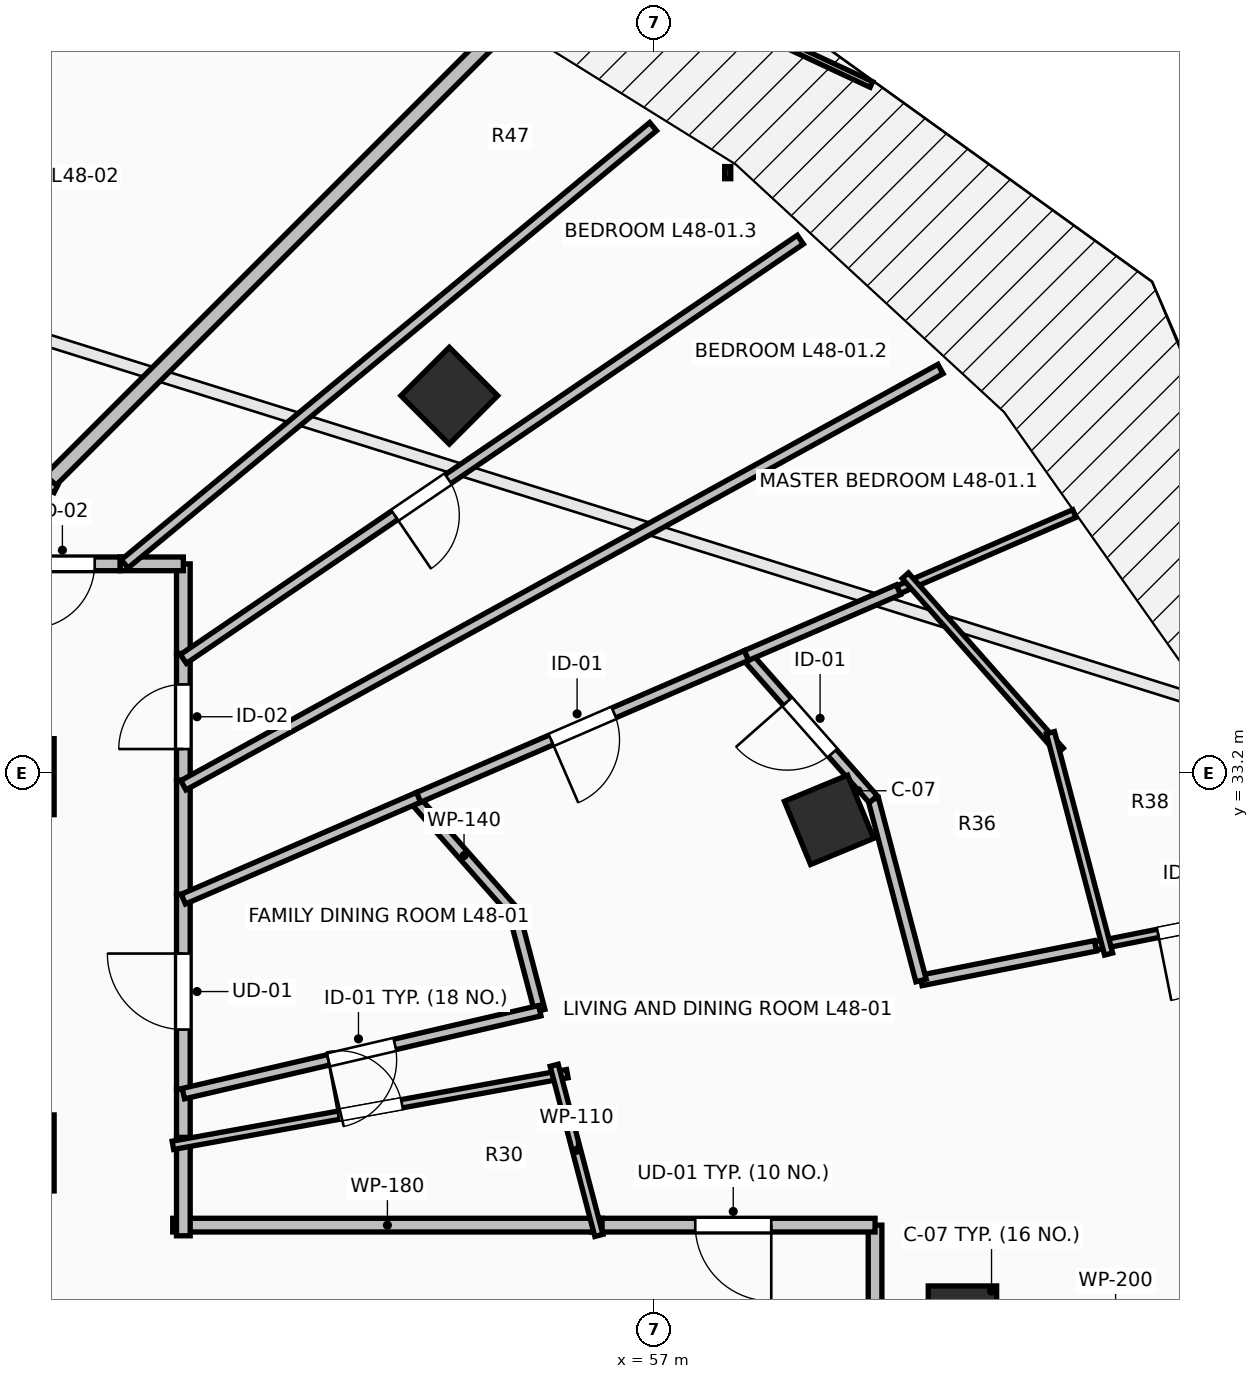
"""IFC4 building model, lengths in metres.
Left out: names, types, materials, properties, quantities, classifications, styles, units other than length and angle.
Written with IfcOpenShell. Run it as: python <this file> out.ifc"""

import sys

from ifc_helpers import new_model, si_unit, direction, frame, frame_2d, origin, origin_2d, place, context, subcontext, project, spatial, rectangle, extrude, element, fill, save


model = new_model("IFC4")
c1 = context("Model", 3, precision=1e-05, world=origin(), true_north=direction((0.0, 1.0)))
c2 = subcontext(c1, "Body", "Model", "MODEL_VIEW")
j1 = project(units=[si_unit("LENGTHUNIT", "METRE"), si_unit("PLANEANGLEUNIT", "RADIAN")], contexts=[c1])
p1 = place(None, origin())
s1 = spatial("IfcSite", under=j1, at=p1, CompositionType="ELEMENT")
p2 = place(p1, origin())
s2 = spatial("IfcBuilding", under=s1, at=p2, CompositionType="ELEMENT")
p3 = place(p2, frame((0.0, 0.0, 179.1)))
s3 = spatial("IfcBuildingStorey", under=s2, at=p3, CompositionType="ELEMENT", Elevation=179.1)
for number, where, z_axis, x_axis in (
    (1, (61.05, 26.0, 0.0), (0.0, 0.0, 1.0), (1.0, 0.0, 0.0)),
    (2, (59.295, 32.582, 0.0), (0.0, 0.0, 1.0), (0.924, 0.383, 0.0)),
    (3, (54.299, 38.162, 0.0), (0.0, 0.0, 1.0), (0.707, 0.707, 0.0)),
):
    element("IfcColumn", number, at=place(p3, frame(where, z_axis=z_axis, x_axis=x_axis)), inside=s3, PredefinedType="COLUMN", context=c2, shape_type="SweptSolid", body=[
        extrude(rectangle(XDim=0.9, YDim=0.9, at=origin_2d()), origin(), (0.0, 0.0, 1.0), 3.5),
    ])
for number, where, z_axis, x_axis in (
    (4, (48.75, 33.15, 0.0), (0.0, 0.0, 1.0), (1.0, 0.0, 0.0)),
    (5, (48.75, 28.2, 0.0), (0.0, 0.0, 1.0), (1.0, 0.0, 0.0)),
):
    element("IfcColumn", number, at=place(p3, frame(where, z_axis=z_axis, x_axis=x_axis)), inside=s3, PredefinedType="PILASTER", context=c2, shape_type="SweptSolid", body=[
        extrude(rectangle(XDim=0.7, YDim=1.0, at=origin_2d()), origin(), (0.0, 0.0, 1.0), 3.5),
    ])
p4 = place(p3, frame((59.9, 25.94, 0.0), z_axis=(0.0, 0.0, 1.0), x_axis=(0.0, 1.0, 0.0)))
e6 = element("IfcWall", 6, at=p4, inside=s3, PredefinedType="PARTITIONING", context=c2, shape_type="SweptSolid", body=[
    extrude(rectangle(XDim=1.31, YDim=0.18, at=frame_2d((0.655, 0.0))), origin(), (0.0, 0.0, 1.0), 2.432),
])
p5 = place(p3, frame((59.9, 27.25, 0.0), z_axis=(0.0, 0.0, 1.0), x_axis=(-1.0, 0.0, 0.0)))
e7 = element("IfcWall", 7, at=p5, inside=s3, PredefinedType="PARTITIONING", context=c2, shape_type="SweptSolid", body=[
    extrude(rectangle(XDim=3.731, YDim=0.18, at=frame_2d((1.865, 0.0))), origin(), (0.0, 0.0, 1.0), 2.874),
])
p6 = place(p5, frame((1.365, 0.0, 0.0)))
e8 = element("IfcOpeningElement", 8, at=p6, cuts=e7, PredefinedType="OPENING", context=c2, shape_type="SweptSolid", body=[
    extrude(rectangle(XDim=1.0, YDim=2.15, at=frame_2d((0.5, 1.075))), frame((0.0, 0.105, 0.0), z_axis=(0.0, -1.0, 0.0), x_axis=(1.0, 0.0, 0.0)), (0.0, 0.0, 1.0), 0.21),
])
p7 = place(p3, frame((50.8, 28.265, 0.0), z_axis=(0.0, 0.0, 1.0), x_axis=(0.0, 1.0, 0.0)))
e9 = element("IfcWall", 9, at=p7, inside=s3, PredefinedType="PARTITIONING", context=c2, shape_type="SweptSolid", body=[
    extrude(rectangle(XDim=0.777, YDim=0.18, at=frame_2d((0.389, 0.0))), origin(), (0.0, 0.0, 1.0), 3.24),
])
p8 = place(p3, frame((50.8, 29.042, 0.0), z_axis=(0.0, 0.0, 1.0), x_axis=(0.0, 1.0, 0.0)))
e10 = element("IfcWall", 10, at=p8, inside=s3, PredefinedType="PARTITIONING", context=c2, shape_type="SweptSolid", body=[
    extrude(rectangle(XDim=2.562, YDim=0.18, at=frame_2d((1.281, 0.0))), origin(), (0.0, 0.0, 1.0), 3.24),
])
p9 = place(p8, frame((0.781, 0.0, 0.0)))
e11 = element("IfcOpeningElement", 11, at=p9, cuts=e10, PredefinedType="OPENING", context=c2, shape_type="SweptSolid", body=[
    extrude(rectangle(XDim=1.0, YDim=2.15, at=frame_2d((0.5, 1.075))), frame((0.0, 0.105, 0.0), z_axis=(0.0, -1.0, 0.0), x_axis=(1.0, 0.0, 0.0)), (0.0, 0.0, 1.0), 0.21),
])
p10 = place(p3, frame((56.309, 27.25, 0.0), z_axis=(0.0, 0.0, 1.0), x_axis=(-1.0, 0.0, 0.0)))
e12 = element("IfcWall", 12, at=p10, inside=s3, PredefinedType="PARTITIONING", context=c2, shape_type="SweptSolid", body=[
    extrude(rectangle(XDim=5.649, YDim=0.18, at=frame_2d((2.825, 0.0))), origin(), (0.0, 0.0, 1.0), 2.432),
])
p11 = place(p3, frame((50.8, 27.11, 0.0), z_axis=(0.0, 0.0, 1.0), x_axis=(0.0, 1.0, 0.0)))
e13 = element("IfcWall", 13, at=p11, inside=s3, PredefinedType="PARTITIONING", context=c2, shape_type="SweptSolid", body=[
    extrude(rectangle(XDim=1.295, YDim=0.18, at=frame_2d((0.647, 0.0))), origin(), (0.0, 0.0, 1.0), 2.432),
])
p12 = place(p3, frame((50.8, 31.604, 0.0), z_axis=(0.0, 0.0, 1.0), x_axis=(0.0, 1.0, 0.0)))
e14 = element("IfcWall", 14, at=p12, inside=s3, PredefinedType="PARTITIONING", context=c2, shape_type="SweptSolid", body=[
    extrude(rectangle(XDim=1.501, YDim=0.18, at=frame_2d((0.75, 0.0))), origin(), (0.0, 0.0, 1.0), 2.432),
])
p13 = place(p3, frame((50.8, 33.105, 0.0), z_axis=(0.0, 0.0, 1.0), x_axis=(0.0, 1.0, 0.0)))
e15 = element("IfcWall", 15, at=p13, inside=s3, PredefinedType="PARTITIONING", context=c2, shape_type="SweptSolid", body=[
    extrude(rectangle(XDim=1.667, YDim=0.18, at=frame_2d((0.833, 0.0))), origin(), (0.0, 0.0, 1.0), 2.432),
])
p14 = place(p13, frame((0.408, 0.0, 0.0)))
e16 = element("IfcOpeningElement", 16, at=p14, cuts=e15, PredefinedType="OPENING", context=c2, shape_type="SweptSolid", body=[
    extrude(rectangle(XDim=0.85, YDim=2.1, at=frame_2d((0.425, 1.05))), frame((0.0, 0.105, 0.0), z_axis=(0.0, -1.0, 0.0), x_axis=(1.0, 0.0, 0.0)), (0.0, 0.0, 1.0), 0.21),
])
p15 = place(p3, frame((50.8, 34.772, 0.0), z_axis=(0.0, 0.0, 1.0), x_axis=(0.0, 1.0, 0.0)))
e17 = element("IfcWall", 17, at=p15, inside=s3, PredefinedType="PARTITIONING", context=c2, shape_type="SweptSolid", body=[
    extrude(rectangle(XDim=1.178, YDim=0.18, at=frame_2d((0.589, 0.0))), origin(), (0.0, 0.0, 1.0), 2.432),
])
p16 = place(p3, frame((50.8, 35.95, 0.0), z_axis=(0.0, 0.0, 1.0), x_axis=(-1.0, 0.0, 0.0)))
e18 = element("IfcWall", 18, at=p16, inside=s3, PredefinedType="PARTITIONING", context=c2, shape_type="SweptSolid", body=[
    extrude(rectangle(XDim=0.833, YDim=0.18, at=frame_2d((0.417, 0.0))), origin(), (0.0, 0.0, 1.0), 3.24),
])
p17 = place(p3, frame((49.967, 35.95, 0.0), z_axis=(0.0, 0.0, 1.0), x_axis=(-1.0, 0.0, 0.0)))
e19 = element("IfcWall", 19, at=p17, inside=s3, PredefinedType="PARTITIONING", context=c2, shape_type="SweptSolid", body=[
    extrude(rectangle(XDim=2.077, YDim=0.18, at=frame_2d((1.039, 0.0))), origin(), (0.0, 0.0, 1.0), 2.432),
])
p18 = place(p17, frame((0.333, 0.0, 0.0)))
e20 = element("IfcOpeningElement", 20, at=p18, cuts=e19, PredefinedType="OPENING", context=c2, shape_type="SweptSolid", body=[
    extrude(rectangle(XDim=0.85, YDim=2.1, at=frame_2d((0.425, 1.05))), frame((0.0, 0.105, 0.0), z_axis=(0.0, -1.0, 0.0), x_axis=(1.0, 0.0, 0.0)), (0.0, 0.0, 1.0), 0.21),
])
p19 = place(p3, frame((53.838, 32.853, 0.0), z_axis=(0.0, 0.0, 1.0), x_axis=(0.662046229388, -0.749463001191, 0.0)))
e21 = element("IfcWall", 21, at=p19, inside=s3, PredefinedType="PARTITIONING", context=c2, shape_type="SweptSolid", body=[
    extrude(rectangle(XDim=1.977, YDim=0.14, at=frame_2d((0.989, 0.0))), origin(), (0.0, 0.0, 1.0), 2.432),
])
p20 = place(p3, frame((55.147, 31.371, 0.0), z_axis=(0.0, 0.0, 1.0), x_axis=(0.25443966192, -0.967088650767, 0.0)))
e22 = element("IfcWall", 22, at=p20, inside=s3, PredefinedType="PARTITIONING", context=c2, shape_type="SweptSolid", body=[
    extrude(rectangle(XDim=1.344, YDim=0.14, at=frame_2d((0.672, 0.0))), origin(), (0.0, 0.0, 1.0), 3.24),
])
p21 = place(p3, frame((55.489, 30.071, 0.0), z_axis=(0.0, 0.0, 1.0), x_axis=(-0.973980178663, -0.226633209333, 0.0)))
e23 = element("IfcWall", 23, at=p21, inside=s3, PredefinedType="PARTITIONING", context=c2, shape_type="SweptSolid", body=[
    extrude(rectangle(XDim=4.814, YDim=0.14, at=frame_2d((2.407, 0.0))), origin(), (0.0, 0.0, 1.0), 2.922),
])
p22 = place(p21, frame((1.957, 0.0, 0.0)))
e24 = element("IfcOpeningElement", 24, at=p22, cuts=e23, PredefinedType="OPENING", context=c2, shape_type="SweptSolid", body=[
    extrude(rectangle(XDim=0.9, YDim=2.1, at=frame_2d((0.45, 1.05))), frame((0.0, 0.085, 0.0), z_axis=(0.0, -1.0, 0.0), x_axis=(1.0, 0.0, 0.0)), (0.0, 0.0, 1.0), 0.17),
])
p23 = place(p3, frame((53.896, 32.879, 0.0), z_axis=(0.0, 0.0, 1.0), x_axis=(-0.917742985146, -0.39717478925, 0.0)))
e25 = element("IfcWall", 25, at=p23, inside=s3, PredefinedType="PARTITIONING", context=c2, shape_type="SweptSolid", body=[
    extrude(rectangle(XDim=3.374, YDim=0.14, at=frame_2d((1.687, 0.0))), origin(), (0.0, 0.0, 1.0), 2.432),
])
p24 = place(p3, frame((50.662, 28.3, 0.0), z_axis=(0.0, 0.0, 1.0), x_axis=(0.983892120625, 0.178763237197, 0.0)))
e26 = element("IfcWall", 26, at=p24, inside=s3, PredefinedType="PARTITIONING", context=c2, shape_type="SweptSolid", body=[
    extrude(rectangle(XDim=5.274, YDim=0.11, at=frame_2d((2.637, 0.0))), origin(), (0.0, 0.0, 1.0), 2.874),
])
p25 = place(p24, frame((2.212, 0.0, 0.0)))
e27 = element("IfcOpeningElement", 27, at=p25, cuts=e26, PredefinedType="OPENING", context=c2, shape_type="SweptSolid", body=[
    extrude(rectangle(XDim=0.85, YDim=2.1, at=frame_2d((0.425, 1.05))), frame((0.0, 0.07, 0.0), z_axis=(0.0, -1.0, 0.0), x_axis=(1.0, 0.0, 0.0)), (0.0, 0.0, 1.0), 0.14),
])
p26 = place(p3, frame((55.678, 29.354, 0.0), z_axis=(0.0, 0.0, 1.0), x_axis=(0.254057219361, -0.96718919002, 0.0)))
e28 = element("IfcWall", 28, at=p26, inside=s3, PredefinedType="PARTITIONING", context=c2, shape_type="SweptSolid", body=[
    extrude(rectangle(XDim=2.315, YDim=0.11, at=frame_2d((1.157, 0.0))), origin(), (0.0, 0.0, 1.0), 2.432),
])
p27 = place(p3, frame((65.327, 31.427, 0.0), z_axis=(0.0, 0.0, 1.0), x_axis=(-0.980809558385, -0.194968228644, 0.0)))
e29 = element("IfcWall", 29, at=p27, inside=s3, PredefinedType="PARTITIONING", context=c2, shape_type="SweptSolid", body=[
    extrude(rectangle(XDim=2.577, YDim=0.11, at=frame_2d((1.289, 0.0))), origin(), (0.0, 0.0, 1.0), 3.24),
])
p28 = place(p27, frame((0.838, 0.0, 0.0)))
e30 = element("IfcOpeningElement", 30, at=p28, cuts=e29, PredefinedType="OPENING", context=c2, shape_type="SweptSolid", body=[
    extrude(rectangle(XDim=0.9, YDim=2.1, at=frame_2d((0.45, 1.05))), frame((0.0, 0.07, 0.0), z_axis=(0.0, -1.0, 0.0), x_axis=(1.0, 0.0, 0.0)), (0.0, 0.0, 1.0), 0.14),
])
p29 = place(p3, frame((60.208, 35.609, 0.0), z_axis=(0.0, 0.0, 1.0), x_axis=(0.917692098887, 0.397292350341, 0.0)))
e31 = element("IfcWall", 31, at=p29, inside=s3, PredefinedType="PARTITIONING", context=c2, shape_type="SweptSolid", body=[
    extrude(rectangle(XDim=2.522, YDim=0.11, at=frame_2d((1.261, 0.0))), origin(), (0.0, 0.0, 1.0), 3.24),
])
p30 = place(p3, frame((62.8, 30.925, 0.0), z_axis=(0.0, 0.0, 1.0), x_axis=(-0.980840670114, -0.194811652245, 0.0)))
e32 = element("IfcWall", 32, at=p30, inside=s3, PredefinedType="PARTITIONING", context=c2, shape_type="SweptSolid", body=[
    extrude(rectangle(XDim=2.34, YDim=0.14, at=frame_2d((1.17, 0.0))), origin(), (0.0, 0.0, 1.0), 3.24),
])
p31 = place(p3, frame((60.505, 30.469, 0.0), z_axis=(0.0, 0.0, 1.0), x_axis=(-0.254702896388, 0.967019355841, 0.0)))
e33 = element("IfcWall", 33, at=p31, inside=s3, PredefinedType="PARTITIONING", context=c2, shape_type="SweptSolid", body=[
    extrude(rectangle(XDim=2.465, YDim=0.14, at=frame_2d((1.233, 0.0))), origin(), (0.0, 0.0, 1.0), 3.24),
])
p32 = place(p3, frame((59.877, 32.853, 0.0), z_axis=(0.0, 0.0, 1.0), x_axis=(-0.661957655691, 0.749541234404, 0.0)))
e34 = element("IfcWall", 34, at=p32, inside=s3, PredefinedType="PARTITIONING", context=c2, shape_type="SweptSolid", body=[
    extrude(rectangle(XDim=2.523, YDim=0.14, at=frame_2d((1.261, 0.0))), origin(), (0.0, 0.0, 1.0), 3.24),
])
p33 = place(p32, frame((0.811, 0.0, 0.0)))
e35 = element("IfcOpeningElement", 35, at=p33, cuts=e34, PredefinedType="OPENING", context=c2, shape_type="SweptSolid", body=[
    extrude(rectangle(XDim=0.9, YDim=2.1, at=frame_2d((0.45, 1.05))), frame((0.0, 0.085, 0.0), z_axis=(0.0, -1.0, 0.0), x_axis=(1.0, 0.0, 0.0)), (0.0, 0.0, 1.0), 0.17),
])
p34 = place(p3, frame((58.207, 34.744, 0.0), z_axis=(0.0, 0.0, 1.0), x_axis=(0.917748928086, 0.397161056748, 0.0)))
e36 = element("IfcWall", 36, at=p34, inside=s3, PredefinedType="PARTITIONING", context=c2, shape_type="SweptSolid", body=[
    extrude(rectangle(XDim=2.18, YDim=0.14, at=frame_2d((1.09, 0.0))), origin(), (0.0, 0.0, 1.0), 3.24),
])
p35 = place(p3, frame((58.207, 34.744, 0.0), z_axis=(0.0, 0.0, 1.0), x_axis=(-0.917771035239, -0.397109968241, 0.0)))
e37 = element("IfcWall", 37, at=p35, inside=s3, PredefinedType="PARTITIONING", context=c2, shape_type="SweptSolid", body=[
    extrude(rectangle(XDim=4.697, YDim=0.14, at=frame_2d((2.349, 0.0))), origin(), (0.0, 0.0, 1.0), 2.432),
])
p36 = place(p35, frame((1.898, 0.0, 0.0)))
e38 = element("IfcOpeningElement", 38, at=p36, cuts=e37, PredefinedType="OPENING", context=c2, shape_type="SweptSolid", body=[
    extrude(rectangle(XDim=0.9, YDim=2.1, at=frame_2d((0.45, 1.05))), frame((0.0, 0.085, 0.0), z_axis=(0.0, -1.0, 0.0), x_axis=(1.0, 0.0, 0.0)), (0.0, 0.0, 1.0), 0.17),
])
p37 = place(p3, frame((60.298, 35.794, 0.0), z_axis=(0.0, 0.0, 1.0), x_axis=(0.662277588726, -0.74925856383, 0.0)))
e39 = element("IfcWall", 39, at=p37, inside=s3, PredefinedType="PARTITIONING", context=c2, shape_type="SweptSolid", body=[
    extrude(rectangle(XDim=3.076, YDim=0.11, at=frame_2d((1.538, 0.0))), origin(), (0.0, 0.0, 1.0), 3.24),
])
p38 = place(p3, frame((62.208, 33.729, 0.0), z_axis=(0.0, 0.0, 1.0), x_axis=(0.254058335644, -0.967188896798, 0.0)))
e40 = element("IfcWall", 40, at=p38, inside=s3, PredefinedType="PARTITIONING", context=c2, shape_type="SweptSolid", body=[
    extrude(rectangle(XDim=3.012, YDim=0.11, at=frame_2d((1.506, 0.0))), origin(), (0.0, 0.0, 1.0), 3.24),
])
p39 = place(p3, frame((60.761, 38.513, 0.0), z_axis=(0.0, 0.0, 1.0), x_axis=(-0.876315654865, -0.481737348602, 0.0)))
e41 = element("IfcWall", 41, at=p39, inside=s3, PredefinedType="PARTITIONING", context=c2, shape_type="SweptSolid", body=[
    extrude(rectangle(XDim=11.367, YDim=0.14, at=frame_2d((5.684, 0.0))), origin(), (0.0, 0.0, 1.0), 2.432),
])
p40 = place(p3, frame((58.917, 40.215, 0.0), z_axis=(0.0, 0.0, 1.0), x_axis=(-0.827087951184, -0.562072522906, 0.0)))
e42 = element("IfcWall", 42, at=p40, inside=s3, PredefinedType="PARTITIONING", context=c2, shape_type="SweptSolid", body=[
    extrude(rectangle(XDim=9.814, YDim=0.14, at=frame_2d((4.907, 0.0))), origin(), (0.0, 0.0, 1.0), 2.432),
])
p41 = place(p40, frame((5.602, 0.0, 0.0)))
e43 = element("IfcOpeningElement", 43, at=p41, cuts=e42, PredefinedType="OPENING", context=c2, shape_type="SweptSolid", body=[
    extrude(rectangle(XDim=0.85, YDim=2.1, at=frame_2d((0.425, 1.05))), frame((0.0, 0.085, 0.0), z_axis=(0.0, -1.0, 0.0), x_axis=(1.0, 0.0, 0.0)), (0.0, 0.0, 1.0), 0.17),
])
p42 = place(p3, frame((56.98, 41.702, 0.0), z_axis=(0.0, 0.0, 1.0), x_axis=(-0.770511618294, -0.637425953405, 0.0)))
e44 = element("IfcWall", 44, at=p42, inside=s3, PredefinedType="PARTITIONING", context=c2, shape_type="SweptSolid", body=[
    extrude(rectangle(XDim=9.024, YDim=0.14, at=frame_2d((4.512, 0.0))), origin(), (0.0, 0.0, 1.0), 2.774),
])
p43 = place(p3, frame((54.959, 42.959, 0.0), z_axis=(0.0, 0.0, 1.0), x_axis=(-0.707106781187, -0.707106781187, 0.0)))
e45 = element("IfcWall", 45, at=p43, inside=s3, PredefinedType="PARTITIONING", context=c2, shape_type="SweptSolid", body=[
    extrude(rectangle(XDim=8.492, YDim=0.2, at=frame_2d((4.246, 0.0))), origin(), (0.0, 0.0, 1.0), 2.774),
])
p44 = place(p3, frame((49.053, 37.053, 0.0), z_axis=(0.0, 0.0, 1.0), x_axis=(-0.707106781187, -0.707106781187, 0.0)))
e46 = element("IfcWall", 46, at=p44, inside=s3, PredefinedType="PARTITIONING", context=c2, shape_type="SweptSolid", body=[
    extrude(rectangle(XDim=1.7, YDim=0.2, at=frame_2d((0.85, 0.0))), origin(), (0.0, 0.0, 1.0), 2.432),
])
p45 = place(p3, frame((46.369, 38.328, 0.0), z_axis=(0.0, 0.0, 1.0), x_axis=(0.892472891666, -0.451101028199, 0.0)))
e47 = element("IfcWall", 47, at=p45, inside=s3, PredefinedType="PARTITIONING", context=c2, shape_type="SweptSolid", body=[
    extrude(rectangle(XDim=3.086, YDim=0.11, at=frame_2d((1.543, 0.0))), origin(), (0.0, 0.0, 1.0), 2.432),
])
p46 = place(p6, origin())
e48 = element("IfcDoor", 48, at=p46, inside=s3, OperationType="SINGLE_SWING_LEFT", PredefinedType="DOOR", context=c2, shape_type="SweptSolid", body=[
    extrude(rectangle(XDim=1.0, YDim=2.15, at=frame_2d((0.5, 1.075))), frame((0.0, 0.025, 0.0), z_axis=(0.0, -1.0, 0.0), x_axis=(1.0, 0.0, 0.0)), (0.0, 0.0, 1.0), 0.05),
])
fill(e8, e48)
p47 = place(p9, origin())
e49 = element("IfcDoor", 49, at=p47, inside=s3, OperationType="SINGLE_SWING_RIGHT", PredefinedType="DOOR", context=c2, shape_type="SweptSolid", body=[
    extrude(rectangle(XDim=1.0, YDim=2.15, at=frame_2d((0.5, 1.075))), frame((0.0, 0.025, 0.0), z_axis=(0.0, -1.0, 0.0), x_axis=(1.0, 0.0, 0.0)), (0.0, 0.0, 1.0), 0.05),
])
fill(e11, e49)
p48 = place(p22, origin())
e50 = element("IfcDoor", 50, at=p48, inside=s3, OperationType="SINGLE_SWING_RIGHT", PredefinedType="DOOR", context=c2, shape_type="SweptSolid", body=[
    extrude(rectangle(XDim=0.9, YDim=2.1, at=frame_2d((0.45, 1.05))), frame((0.0, 0.025, 0.0), z_axis=(0.0, -1.0, 0.0), x_axis=(1.0, 0.0, 0.0)), (0.0, 0.0, 1.0), 0.05),
])
fill(e24, e50)
p49 = place(p25, origin())
e51 = element("IfcDoor", 51, at=p49, inside=s3, OperationType="SINGLE_SWING_LEFT", PredefinedType="DOOR", context=c2, shape_type="SweptSolid", body=[
    extrude(rectangle(XDim=0.85, YDim=2.1, at=frame_2d((0.425, 1.05))), frame((0.0, 0.025, 0.0), z_axis=(0.0, -1.0, 0.0), x_axis=(1.0, 0.0, 0.0)), (0.0, 0.0, 1.0), 0.05),
])
fill(e27, e51)
p50 = place(p28, origin())
e52 = element("IfcDoor", 52, at=p50, inside=s3, OperationType="SINGLE_SWING_RIGHT", PredefinedType="DOOR", context=c2, shape_type="SweptSolid", body=[
    extrude(rectangle(XDim=0.9, YDim=2.1, at=frame_2d((0.45, 1.05))), frame((0.0, 0.025, 0.0), z_axis=(0.0, -1.0, 0.0), x_axis=(1.0, 0.0, 0.0)), (0.0, 0.0, 1.0), 0.05),
])
fill(e30, e52)
p51 = place(p33, origin())
e53 = element("IfcDoor", 53, at=p51, inside=s3, OperationType="SINGLE_SWING_RIGHT", PredefinedType="DOOR", context=c2, shape_type="SweptSolid", body=[
    extrude(rectangle(XDim=0.9, YDim=2.1, at=frame_2d((0.45, 1.05))), frame((0.0, 0.025, 0.0), z_axis=(0.0, -1.0, 0.0), x_axis=(1.0, 0.0, 0.0)), (0.0, 0.0, 1.0), 0.05),
])
fill(e35, e53)
p52 = place(p36, origin())
e54 = element("IfcDoor", 54, at=p52, inside=s3, OperationType="SINGLE_SWING_RIGHT", PredefinedType="DOOR", context=c2, shape_type="SweptSolid", body=[
    extrude(rectangle(XDim=0.9, YDim=2.1, at=frame_2d((0.45, 1.05))), frame((0.0, 0.025, 0.0), z_axis=(0.0, -1.0, 0.0), x_axis=(1.0, 0.0, 0.0)), (0.0, 0.0, 1.0), 0.05),
])
fill(e38, e54)
p53 = place(p14, origin())
e55 = element("IfcDoor", 55, at=p53, inside=s3, OperationType="SINGLE_SWING_LEFT", PredefinedType="DOOR", context=c2, shape_type="SweptSolid", body=[
    extrude(rectangle(XDim=0.85, YDim=2.1, at=frame_2d((0.425, 1.05))), frame((0.0, 0.025, 0.0), z_axis=(0.0, -1.0, 0.0), x_axis=(1.0, 0.0, 0.0)), (0.0, 0.0, 1.0), 0.05),
])
fill(e16, e55)
p54 = place(p18, origin())
e56 = element("IfcDoor", 56, at=p54, inside=s3, OperationType="SINGLE_SWING_RIGHT", PredefinedType="DOOR", context=c2, shape_type="SweptSolid", body=[
    extrude(rectangle(XDim=0.85, YDim=2.1, at=frame_2d((0.425, 1.05))), frame((0.0, 0.025, 0.0), z_axis=(0.0, -1.0, 0.0), x_axis=(1.0, 0.0, 0.0)), (0.0, 0.0, 1.0), 0.05),
])
fill(e20, e56)
p55 = place(p41, origin())
e57 = element("IfcDoor", 57, at=p55, inside=s3, OperationType="SINGLE_SWING_RIGHT", PredefinedType="DOOR", context=c2, shape_type="SweptSolid", body=[
    extrude(rectangle(XDim=0.85, YDim=2.1, at=frame_2d((0.425, 1.05))), frame((0.0, 0.025, 0.0), z_axis=(0.0, -1.0, 0.0), x_axis=(1.0, 0.0, 0.0)), (0.0, 0.0, 1.0), 0.05),
])
fill(e43, e57)
save(model, sys.argv[1])
